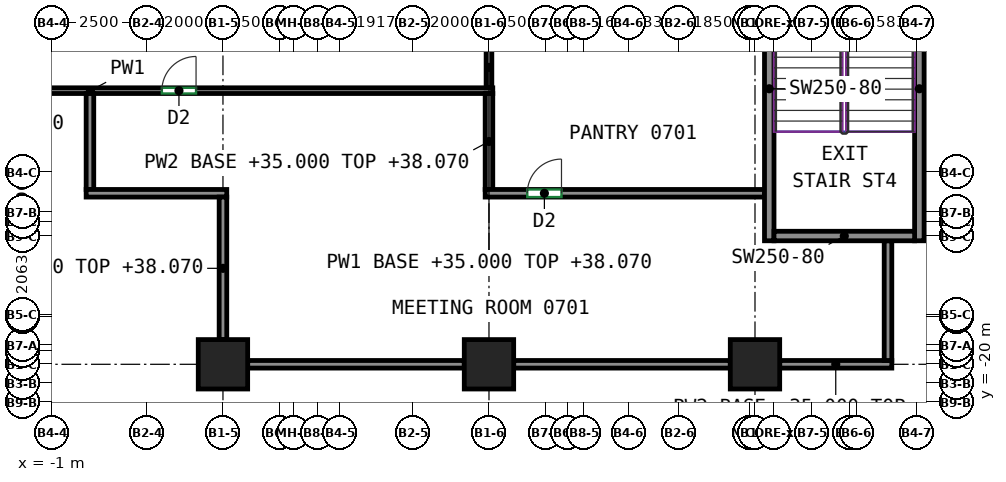
"""IFC4 building model, lengths in metres.
Left out: names, types, materials, properties, quantities, classifications, styles, units other than length and angle.
Written with IfcOpenShell. Run it as: python <this file> out.ifc"""

import sys

from ifc_helpers import new_model, si_unit, direction, frame, frame_2d, origin, origin_2d, place, context, subcontext, project, spatial, rectangle, extrude, source, transform, mapped, element, fill, save


model = new_model("IFC4")
c1 = context("Model", 3, precision=1e-05, world=origin(), true_north=direction((0.0, 1.0)))
c2 = subcontext(c1, "Body", "Model", "MODEL_VIEW")
j1 = project(units=[si_unit("LENGTHUNIT", "METRE"), si_unit("PLANEANGLEUNIT", "RADIAN")], contexts=[c1])
p1 = place(None, origin())
s1 = spatial("IfcSite", under=j1, at=p1, CompositionType="ELEMENT")
p2 = place(p1, origin())
s2 = spatial("IfcBuilding", under=s1, at=p2, CompositionType="ELEMENT")
p3 = place(p2, frame((0.0, 0.0, 35.0)))
s3 = spatial("IfcBuildingStorey", under=s2, at=p3, CompositionType="ELEMENT", Elevation=35.0)
m1 = source(origin(), c2, "Body", "SweptSolid", [
    extrude(rectangle(XDim=1.3, YDim=1.3, at=origin_2d()), origin(), (0.0, 0.0, 1.0), 3.72),
])
for number, where, z_axis, x_axis in (
    (1, (3.5, -19.0, 0.0), (0.0, 0.0, 1.0), (1.0, 0.0, 0.0)),
    (2, (10.5, -19.0, 0.0), (0.0, 0.0, 1.0), (1.0, 0.0, 0.0)),
    (3, (17.5, -19.0, 0.0), (0.0, 0.0, 1.0), (1.0, 0.0, 0.0)),
):
    element("IfcColumn", number, at=place(p3, frame(where, z_axis=z_axis, x_axis=x_axis)), inside=s3, PredefinedType="COLUMN", context=c2, shape_type="MappedRepresentation", body=[
        mapped(m1, transform((0.0, 0.0, 0.0))),
    ])
m2 = source(origin(), c2, "Body", "SweptSolid", [
    extrude(rectangle(XDim=8.0, YDim=0.25, at=frame_2d((4.0, 0.0))), origin(), (0.0, 0.0, 1.0), 3.72),
])
for number, where, z_axis, x_axis in (
    (4, (17.875, -15.75, 0.0), (0.0, 0.0, 1.0), (0.0, 1.0, 0.0)),
    (5, (21.825, -15.75, 0.0), (0.0, 0.0, 1.0), (0.0, 1.0, 0.0)),
):
    element("IfcWall", number, at=place(p3, frame(where, z_axis=z_axis, x_axis=x_axis)), inside=s3, PredefinedType="SHEAR", context=c2, shape_type="MappedRepresentation", body=[
        mapped(m2, transform((0.0, 0.0, 0.0))),
    ])
m3 = source(origin(), c2, "Body", "SweptSolid", [
    extrude(rectangle(XDim=3.7, YDim=0.25, at=frame_2d((1.85, 0.0))), origin(), (0.0, 0.0, 1.0), 3.72),
])
p4 = place(p3, frame((18.0, -15.625, 0.0), z_axis=(0.0, 0.0, 1.0), x_axis=(1.0, 0.0, 0.0)))
e6 = element("IfcWall", 6, at=p4, inside=s3, PredefinedType="SHEAR", context=c2, shape_type="MappedRepresentation", body=[
    mapped(m3, transform((0.0, 0.0, 0.0))),
])
p5 = place(p3, frame((-10.575, -11.8, 0.0), z_axis=(0.0, 0.0, 1.0), x_axis=(1.0, 0.0, 0.0)))
e7 = element("IfcWall", 7, at=p5, inside=s3, PredefinedType="PARTITIONING", context=c2, shape_type="SweptSolid", body=[
    extrude(rectangle(XDim=21.175, YDim=0.15, at=frame_2d((10.587, 0.0))), origin(), (0.0, 0.0, 1.0), 3.72),
])
p6 = place(p5, frame((2.018, 0.0, 0.0)))
e8 = element("IfcOpeningElement", 8, at=p6, cuts=e7, PredefinedType="OPENING", context=c2, shape_type="SweptSolid", body=[
    extrude(rectangle(XDim=1.8, YDim=2.1, at=frame_2d((0.9, 1.05))), frame((0.0, 0.085, 0.0), z_axis=(0.0, -1.0, 0.0), x_axis=(1.0, 0.0, 0.0)), (0.0, 0.0, 1.0), 0.17),
])
p7 = place(p5, frame((12.467, 0.0, 0.0)))
e9 = element("IfcOpeningElement", 9, at=p7, cuts=e7, PredefinedType="OPENING", context=c2, shape_type="SweptSolid", body=[
    extrude(rectangle(XDim=0.9, YDim=2.1, at=frame_2d((0.45, 1.05))), frame((0.0, 0.085, 0.0), z_axis=(0.0, -1.0, 0.0), x_axis=(1.0, 0.0, 0.0)), (0.0, 0.0, 1.0), 0.17),
])
p8 = place(p3, frame((10.5, -11.725, 0.0), z_axis=(0.0, 0.0, 1.0), x_axis=(0.0, 1.0, 0.0)))
e10 = element("IfcWall", 10, at=p8, inside=s3, PredefinedType="PARTITIONING", context=c2, shape_type="SweptSolid", body=[
    extrude(rectangle(XDim=1.075, YDim=0.15, at=frame_2d((0.538, 0.0))), origin(), (0.0, 0.0, 1.0), 3.07),
])
p9 = place(p3, frame((0.0, -14.4, 0.0), z_axis=(0.0, 0.0, 1.0), x_axis=(0.0, 1.0, 0.0)))
e11 = element("IfcWall", 11, at=p9, inside=s3, PredefinedType="PARTITIONING", context=c2, shape_type="SweptSolid", body=[
    extrude(rectangle(XDim=2.524, YDim=0.2, at=frame_2d((1.262, 0.0))), origin(), (0.0, 0.0, 1.0), 3.72),
])
p10 = place(p3, frame((-0.1, -14.5, 0.0), z_axis=(0.0, 0.0, 1.0), x_axis=(1.0, 0.0, 0.0)))
e12 = element("IfcWall", 12, at=p10, inside=s3, PredefinedType="PARTITIONING", context=c2, shape_type="SweptSolid", body=[
    extrude(rectangle(XDim=3.7, YDim=0.2, at=frame_2d((1.85, 0.0))), origin(), (0.0, 0.0, 1.0), 3.72),
])
p11 = place(p3, frame((3.5, -18.35, 0.0), z_axis=(0.0, 0.0, 1.0), x_axis=(0.0, 1.0, 0.0)))
e13 = element("IfcWall", 13, at=p11, inside=s3, PredefinedType="PARTITIONING", context=c2, shape_type="SweptSolid", body=[
    extrude(rectangle(XDim=3.75, YDim=0.2, at=frame_2d((1.875, 0.0))), origin(), (0.0, 0.0, 1.0), 3.07),
])
for number, where, z_axis, x_axis in (
    (14, (4.15, -19.0, 0.0), (0.0, 0.0, 1.0), (1.0, 0.0, 0.0)),
    (15, (11.15, -19.0, 0.0), (0.0, 0.0, 1.0), (1.0, 0.0, 0.0)),
):
    element("IfcWall", number, at=place(p3, frame(where, z_axis=z_axis, x_axis=x_axis)), inside=s3, PredefinedType="PARTITIONING", context=c2, shape_type="SweptSolid", body=[
        extrude(rectangle(XDim=5.7, YDim=0.2, at=frame_2d((2.85, 0.0))), origin(), (0.0, 0.0, 1.0), 3.72),
    ])
p12 = place(p3, frame((18.15, -19.0, 0.0), z_axis=(0.0, 0.0, 1.0), x_axis=(1.0, 0.0, 0.0)))
e16 = element("IfcWall", 16, at=p12, inside=s3, PredefinedType="PARTITIONING", context=c2, shape_type="SweptSolid", body=[
    extrude(rectangle(XDim=2.95, YDim=0.2, at=frame_2d((1.475, 0.0))), origin(), (0.0, 0.0, 1.0), 3.07),
])
p13 = place(p3, frame((21.0, -15.75, 0.0), z_axis=(0.0, 0.0, 1.0), x_axis=(0.0, -1.0, 0.0)))
e17 = element("IfcWall", 17, at=p13, inside=s3, PredefinedType="PARTITIONING", context=c2, shape_type="SweptSolid", body=[
    extrude(rectangle(XDim=3.15, YDim=0.2, at=frame_2d((1.575, 0.0))), origin(), (0.0, 0.0, 1.0), 3.72),
])
p14 = place(p3, frame((21.95, -14.5, 0.0), z_axis=(0.0, 0.0, 1.0), x_axis=(1.0, 0.0, 0.0)))
e18 = element("IfcWall", 18, at=p14, inside=s3, PredefinedType="PARTITIONING", context=c2, shape_type="SweptSolid", body=[
    extrude(rectangle(XDim=5.8, YDim=0.2, at=frame_2d((2.9, 0.0))), origin(), (0.0, 0.0, 1.0), 3.72),
])
p15 = place(p3, frame((10.5, -14.4, 0.0), z_axis=(0.0, 0.0, 1.0), x_axis=(0.0, 1.0, 0.0)))
e19 = element("IfcWall", 19, at=p15, inside=s3, PredefinedType="PARTITIONING", context=c2, shape_type="SweptSolid", body=[
    extrude(rectangle(XDim=2.524, YDim=0.2, at=frame_2d((1.262, 0.0))), origin(), (0.0, 0.0, 1.0), 3.07),
])
p16 = place(p3, frame((10.4, -14.5, 0.0), z_axis=(0.0, 0.0, 1.0), x_axis=(1.0, 0.0, 0.0)))
e20 = element("IfcWall", 20, at=p16, inside=s3, PredefinedType="PARTITIONING", context=c2, shape_type="SweptSolid", body=[
    extrude(rectangle(XDim=7.35, YDim=0.2, at=frame_2d((3.675, 0.0))), origin(), (0.0, 0.0, 1.0), 3.72),
])
p17 = place(p16, frame((1.108, 0.0, 0.0)))
e21 = element("IfcOpeningElement", 21, at=p17, cuts=e20, PredefinedType="OPENING", context=c2, shape_type="SweptSolid", body=[
    extrude(rectangle(XDim=0.9, YDim=2.1, at=frame_2d((0.45, 1.05))), frame((0.0, 0.11, 0.0), z_axis=(0.0, -1.0, 0.0), x_axis=(1.0, 0.0, 0.0)), (0.0, 0.0, 1.0), 0.22),
])
p18 = place(p17, origin())
e22 = element("IfcDoor", 22, at=p18, inside=s3, OperationType="SINGLE_SWING_RIGHT", PredefinedType="DOOR", context=c2, shape_type="SweptSolid", body=[
    extrude(rectangle(XDim=0.9, YDim=2.1, at=frame_2d((0.45, 1.05))), frame((0.0, 0.025, 0.0), z_axis=(0.0, -1.0, 0.0), x_axis=(1.0, 0.0, 0.0)), (0.0, 0.0, 1.0), 0.05),
])
fill(e21, e22)
p19 = place(p7, origin())
e23 = element("IfcDoor", 23, at=p19, inside=s3, OperationType="SINGLE_SWING_RIGHT", PredefinedType="DOOR", context=c2, shape_type="SweptSolid", body=[
    extrude(rectangle(XDim=0.9, YDim=2.1, at=frame_2d((0.45, 1.05))), frame((0.0, 0.025, 0.0), z_axis=(0.0, -1.0, 0.0), x_axis=(1.0, 0.0, 0.0)), (0.0, 0.0, 1.0), 0.05),
])
fill(e9, e23)
save(model, sys.argv[1])
